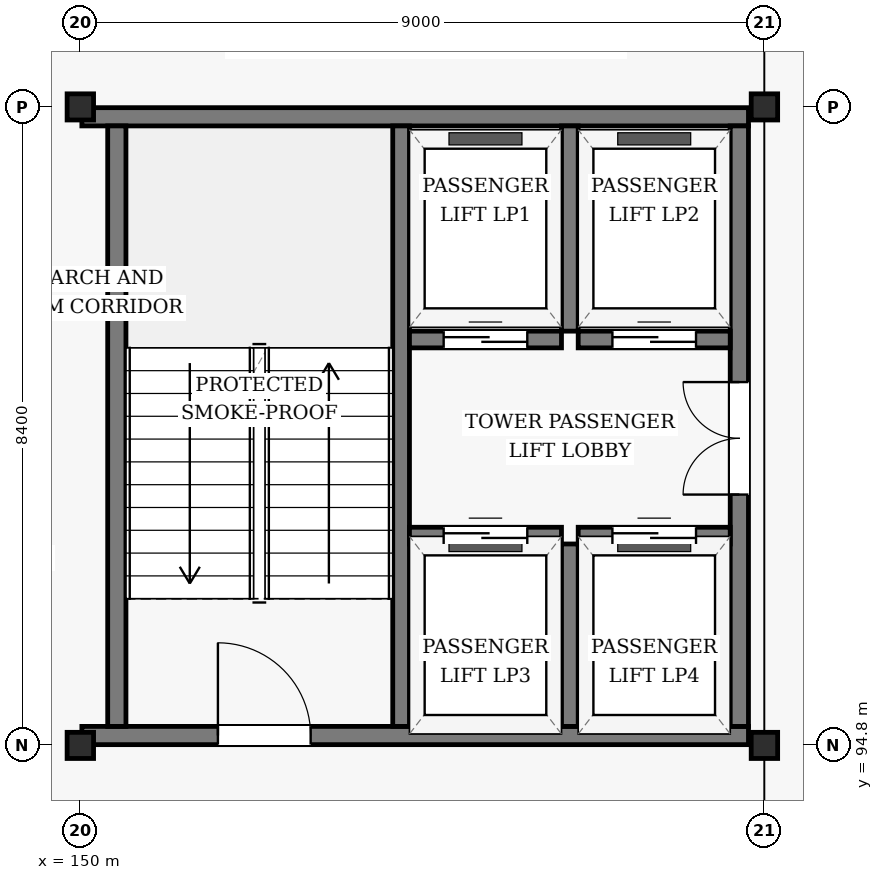
"""IFC4 building model, lengths in metres.
Left out: names, types, materials, properties, quantities, classifications, styles, units other than length and angle.
Written with IfcOpenShell. Run it as: python <this file> out.ifc"""

import sys

from ifc_helpers import new_model, si_unit, direction, frame, frame_2d, origin, origin_2d, place, context, subcontext, project, spatial, rectangle, i_section, extrude, element, fill, save


model = new_model("IFC4")
c1 = context("Model", 3, precision=1e-05, world=origin(), true_north=direction((0.0, 1.0)))
c2 = subcontext(c1, "Body", "Model", "MODEL_VIEW")
j1 = project(units=[si_unit("LENGTHUNIT", "METRE"), si_unit("PLANEANGLEUNIT", "RADIAN")], contexts=[c1])
p1 = place(None, origin())
s1 = spatial("IfcSite", under=j1, at=p1, CompositionType="ELEMENT")
p2 = place(p1, origin())
s2 = spatial("IfcBuilding", under=s1, at=p2, CompositionType="ELEMENT")
p3 = place(p2, frame((0.0, 0.0, 43.2)))
s3 = spatial("IfcBuildingStorey", under=s2, at=p3, CompositionType="ELEMENT", Elevation=43.2)
for number, where, z_axis, x_axis in (
    (1, (150.0, 94.8, 0.0), (0.0, 0.0, 1.0), (1.0, 0.0, 0.0)),
    (2, (150.0, 103.2, 0.0), (0.0, 0.0, 1.0), (1.0, 0.0, 0.0)),
    (3, (159.0, 94.8, 0.0), (0.0, 0.0, 1.0), (1.0, 0.0, 0.0)),
    (4, (159.0, 103.2, 0.0), (0.0, 0.0, 1.0), (1.0, 0.0, 0.0)),
):
    element("IfcColumn", number, at=place(p3, frame(where, z_axis=z_axis, x_axis=x_axis)), inside=s3, PredefinedType="COLUMN", context=c2, shape_type="SweptSolid", body=[
        extrude(i_section(OverallWidth=0.348, OverallDepth=0.344, WebThickness=0.01, FlangeThickness=0.016, FilletRadius=0.02, at=origin_2d()), origin(), (0.0, 0.0, 1.0), 3.6),
    ])
p4 = place(p3, frame((150.02, 94.93, 0.0), z_axis=(0.0, 0.0, 1.0), x_axis=(1.0, 0.0, 0.0)))
e5 = element("IfcWall", 5, at=p4, inside=s3, PredefinedType="SHEAR", context=c2, shape_type="SweptSolid", body=[
    extrude(rectangle(XDim=8.77, YDim=0.24, at=frame_2d((4.385, 0.0))), origin(), (0.0, 0.0, 1.0), 3.354),
])
p5 = place(p4, frame((1.79, 0.0, 0.0)))
e6 = element("IfcOpeningElement", 6, at=p5, cuts=e5, PredefinedType="OPENING", context=c2, shape_type="SweptSolid", body=[
    extrude(rectangle(XDim=1.22, YDim=2.18, at=frame_2d((0.61, 1.09))), frame((0.0, 0.13, 0.0), z_axis=(0.0, -1.0, 0.0), x_axis=(1.0, 0.0, 0.0)), (0.0, 0.0, 1.0), 0.26),
])
p6 = place(p3, frame((150.02, 103.07, 0.0), z_axis=(0.0, 0.0, 1.0), x_axis=(1.0, 0.0, 0.0)))
e7 = element("IfcWall", 7, at=p6, inside=s3, PredefinedType="SHEAR", context=c2, shape_type="SweptSolid", body=[
    extrude(rectangle(XDim=8.77, YDim=0.24, at=frame_2d((4.385, 0.0))), origin(), (0.0, 0.0, 1.0), 3.354),
])
p7 = place(p3, frame((150.48, 95.05, 0.0), z_axis=(0.0, 0.0, 1.0), x_axis=(0.0, 1.0, 0.0)))
e8 = element("IfcWall", 8, at=p7, inside=s3, PredefinedType="SHEAR", context=c2, shape_type="SweptSolid", body=[
    extrude(rectangle(XDim=7.9, YDim=0.24, at=frame_2d((3.95, 0.0))), origin(), (0.0, 0.0, 1.0), 3.354),
])
p8 = place(p3, frame((154.22, 95.05, 0.0), z_axis=(0.0, 0.0, 1.0), x_axis=(0.0, 1.0, 0.0)))
e9 = element("IfcWall", 9, at=p8, inside=s3, PredefinedType="SHEAR", context=c2, shape_type="SweptSolid", body=[
    extrude(rectangle(XDim=7.9, YDim=0.22, at=frame_2d((3.95, 0.0))), origin(), (0.0, 0.0, 1.0), 3.354),
])
p9 = place(p3, frame((158.67, 95.05, 0.0), z_axis=(0.0, 0.0, 1.0), x_axis=(0.0, 1.0, 0.0)))
e10 = element("IfcWall", 10, at=p9, inside=s3, PredefinedType="SHEAR", context=c2, shape_type="SweptSolid", body=[
    extrude(rectangle(XDim=7.9, YDim=0.24, at=frame_2d((3.95, 0.0))), origin(), (0.0, 0.0, 1.0), 3.354),
])
p10 = place(p9, frame((3.05, 0.0, 0.0)))
e11 = element("IfcOpeningElement", 11, at=p10, cuts=e10, PredefinedType="OPENING", context=c2, shape_type="SweptSolid", body=[
    extrude(rectangle(XDim=1.48, YDim=2.22, at=frame_2d((0.74, 1.11))), frame((0.0, 0.13, 0.0), z_axis=(0.0, -1.0, 0.0), x_axis=(1.0, 0.0, 0.0)), (0.0, 0.0, 1.0), 0.26),
])
p11 = place(p3, frame((156.44, 100.25, 0.0), z_axis=(0.0, 0.0, 1.0), x_axis=(0.0, 1.0, 0.0)))
e12 = element("IfcWall", 12, at=p11, inside=s3, PredefinedType="SHEAR", context=c2, shape_type="SweptSolid", body=[
    extrude(rectangle(XDim=2.7, YDim=0.22, at=frame_2d((1.35, 0.0))), origin(), (0.0, 0.0, 1.0), 3.354),
])
p12 = place(p3, frame((154.33, 100.14, 0.0), z_axis=(0.0, 0.0, 1.0), x_axis=(1.0, 0.0, 0.0)))
e13 = element("IfcWall", 13, at=p12, inside=s3, PredefinedType="SHEAR", context=c2, shape_type="SweptSolid", body=[
    extrude(rectangle(XDim=2.0, YDim=0.22, at=frame_2d((1.0, 0.0))), origin(), (0.0, 0.0, 1.0), 3.354),
])
p13 = place(p12, frame((0.45, 0.0, 0.0)))
e14 = element("IfcOpeningElement", 14, at=p13, cuts=e13, PredefinedType="OPENING", context=c2, shape_type="SweptSolid", body=[
    extrude(rectangle(XDim=1.1, YDim=2.15, at=frame_2d((0.55, 1.075))), frame((0.0, 0.12, 0.0), z_axis=(0.0, -1.0, 0.0), x_axis=(1.0, 0.0, 0.0)), (0.0, 0.0, 1.0), 0.24),
])
p14 = place(p3, frame((156.55, 100.14, 0.0), z_axis=(0.0, 0.0, 1.0), x_axis=(1.0, 0.0, 0.0)))
e15 = element("IfcWall", 15, at=p14, inside=s3, PredefinedType="SHEAR", context=c2, shape_type="SweptSolid", body=[
    extrude(rectangle(XDim=2.0, YDim=0.22, at=frame_2d((1.0, 0.0))), origin(), (0.0, 0.0, 1.0), 3.354),
])
p15 = place(p14, frame((0.45, 0.0, 0.0)))
e16 = element("IfcOpeningElement", 16, at=p15, cuts=e15, PredefinedType="OPENING", context=c2, shape_type="SweptSolid", body=[
    extrude(rectangle(XDim=1.1, YDim=2.15, at=frame_2d((0.55, 1.075))), frame((0.0, 0.12, 0.0), z_axis=(0.0, -1.0, 0.0), x_axis=(1.0, 0.0, 0.0)), (0.0, 0.0, 1.0), 0.24),
])
p16 = place(p3, frame((156.44, 95.05, 0.0), z_axis=(0.0, 0.0, 1.0), x_axis=(0.0, 1.0, 0.0)))
e17 = element("IfcWall", 17, at=p16, inside=s3, PredefinedType="SHEAR", context=c2, shape_type="SweptSolid", body=[
    extrude(rectangle(XDim=2.4, YDim=0.22, at=frame_2d((1.2, 0.0))), origin(), (0.0, 0.0, 1.0), 3.354),
])
p17 = place(p3, frame((154.33, 97.56, 0.0), z_axis=(0.0, 0.0, 1.0), x_axis=(1.0, 0.0, 0.0)))
e18 = element("IfcWall", 18, at=p17, inside=s3, PredefinedType="SHEAR", context=c2, shape_type="SweptSolid", body=[
    extrude(rectangle(XDim=2.0, YDim=0.22, at=frame_2d((1.0, 0.0))), origin(), (0.0, 0.0, 1.0), 3.354),
])
p18 = place(p17, frame((0.45, 0.0, 0.0)))
e19 = element("IfcOpeningElement", 19, at=p18, cuts=e18, PredefinedType="OPENING", context=c2, shape_type="SweptSolid", body=[
    extrude(rectangle(XDim=1.1, YDim=2.15, at=frame_2d((0.55, 1.075))), frame((0.0, 0.12, 0.0), z_axis=(0.0, -1.0, 0.0), x_axis=(1.0, 0.0, 0.0)), (0.0, 0.0, 1.0), 0.24),
])
p19 = place(p3, frame((156.55, 97.56, 0.0), z_axis=(0.0, 0.0, 1.0), x_axis=(1.0, 0.0, 0.0)))
e20 = element("IfcWall", 20, at=p19, inside=s3, PredefinedType="SHEAR", context=c2, shape_type="SweptSolid", body=[
    extrude(rectangle(XDim=2.0, YDim=0.22, at=frame_2d((1.0, 0.0))), origin(), (0.0, 0.0, 1.0), 3.354),
])
p20 = place(p19, frame((0.45, 0.0, 0.0)))
e21 = element("IfcOpeningElement", 21, at=p20, cuts=e20, PredefinedType="OPENING", context=c2, shape_type="SweptSolid", body=[
    extrude(rectangle(XDim=1.1, YDim=2.15, at=frame_2d((0.55, 1.075))), frame((0.0, 0.12, 0.0), z_axis=(0.0, -1.0, 0.0), x_axis=(1.0, 0.0, 0.0)), (0.0, 0.0, 1.0), 0.24),
])
p21 = place(p5, origin())
e22 = element("IfcDoor", 22, at=p21, inside=s3, OperationType="SINGLE_SWING_LEFT", PredefinedType="DOOR", context=c2, shape_type="SweptSolid", body=[
    extrude(rectangle(XDim=1.22, YDim=2.18, at=frame_2d((0.61, 1.09))), frame((0.0, 0.025, 0.0), z_axis=(0.0, -1.0, 0.0), x_axis=(1.0, 0.0, 0.0)), (0.0, 0.0, 1.0), 0.05),
])
fill(e6, e22)
p22 = place(p10, origin())
e23 = element("IfcDoor", 23, at=p22, inside=s3, OperationType="DOUBLE_DOOR_SINGLE_SWING", PredefinedType="DOOR", context=c2, shape_type="SweptSolid", body=[
    extrude(rectangle(XDim=1.48, YDim=2.22, at=frame_2d((0.74, 1.11))), frame((0.0, 0.025, 0.0), z_axis=(0.0, -1.0, 0.0), x_axis=(1.0, 0.0, 0.0)), (0.0, 0.0, 1.0), 0.05),
])
fill(e11, e23)
p23 = place(p13, origin())
e24 = element("IfcDoor", 24, at=p23, inside=s3, OperationType="SLIDING_TO_LEFT", PredefinedType="DOOR", context=c2, shape_type="SweptSolid", body=[
    extrude(rectangle(XDim=1.1, YDim=2.15, at=frame_2d((0.55, 1.075))), frame((0.0, 0.025, 0.0), z_axis=(0.0, -1.0, 0.0), x_axis=(1.0, 0.0, 0.0)), (0.0, 0.0, 1.0), 0.05),
])
fill(e14, e24)
p24 = place(p15, origin())
e25 = element("IfcDoor", 25, at=p24, inside=s3, OperationType="SLIDING_TO_LEFT", PredefinedType="DOOR", context=c2, shape_type="SweptSolid", body=[
    extrude(rectangle(XDim=1.1, YDim=2.15, at=frame_2d((0.55, 1.075))), frame((0.0, 0.025, 0.0), z_axis=(0.0, -1.0, 0.0), x_axis=(1.0, 0.0, 0.0)), (0.0, 0.0, 1.0), 0.05),
])
fill(e16, e25)
p25 = place(p18, origin())
e26 = element("IfcDoor", 26, at=p25, inside=s3, OperationType="SLIDING_TO_LEFT", PredefinedType="DOOR", context=c2, shape_type="SweptSolid", body=[
    extrude(rectangle(XDim=1.1, YDim=2.15, at=frame_2d((0.55, 1.075))), frame((0.0, 0.025, 0.0), z_axis=(0.0, -1.0, 0.0), x_axis=(1.0, 0.0, 0.0)), (0.0, 0.0, 1.0), 0.05),
])
fill(e19, e26)
p26 = place(p20, origin())
e27 = element("IfcDoor", 27, at=p26, inside=s3, OperationType="SLIDING_TO_LEFT", PredefinedType="DOOR", context=c2, shape_type="SweptSolid", body=[
    extrude(rectangle(XDim=1.1, YDim=2.15, at=frame_2d((0.55, 1.075))), frame((0.0, 0.025, 0.0), z_axis=(0.0, -1.0, 0.0), x_axis=(1.0, 0.0, 0.0)), (0.0, 0.0, 1.0), 0.05),
])
fill(e21, e27)
save(model, sys.argv[1])
